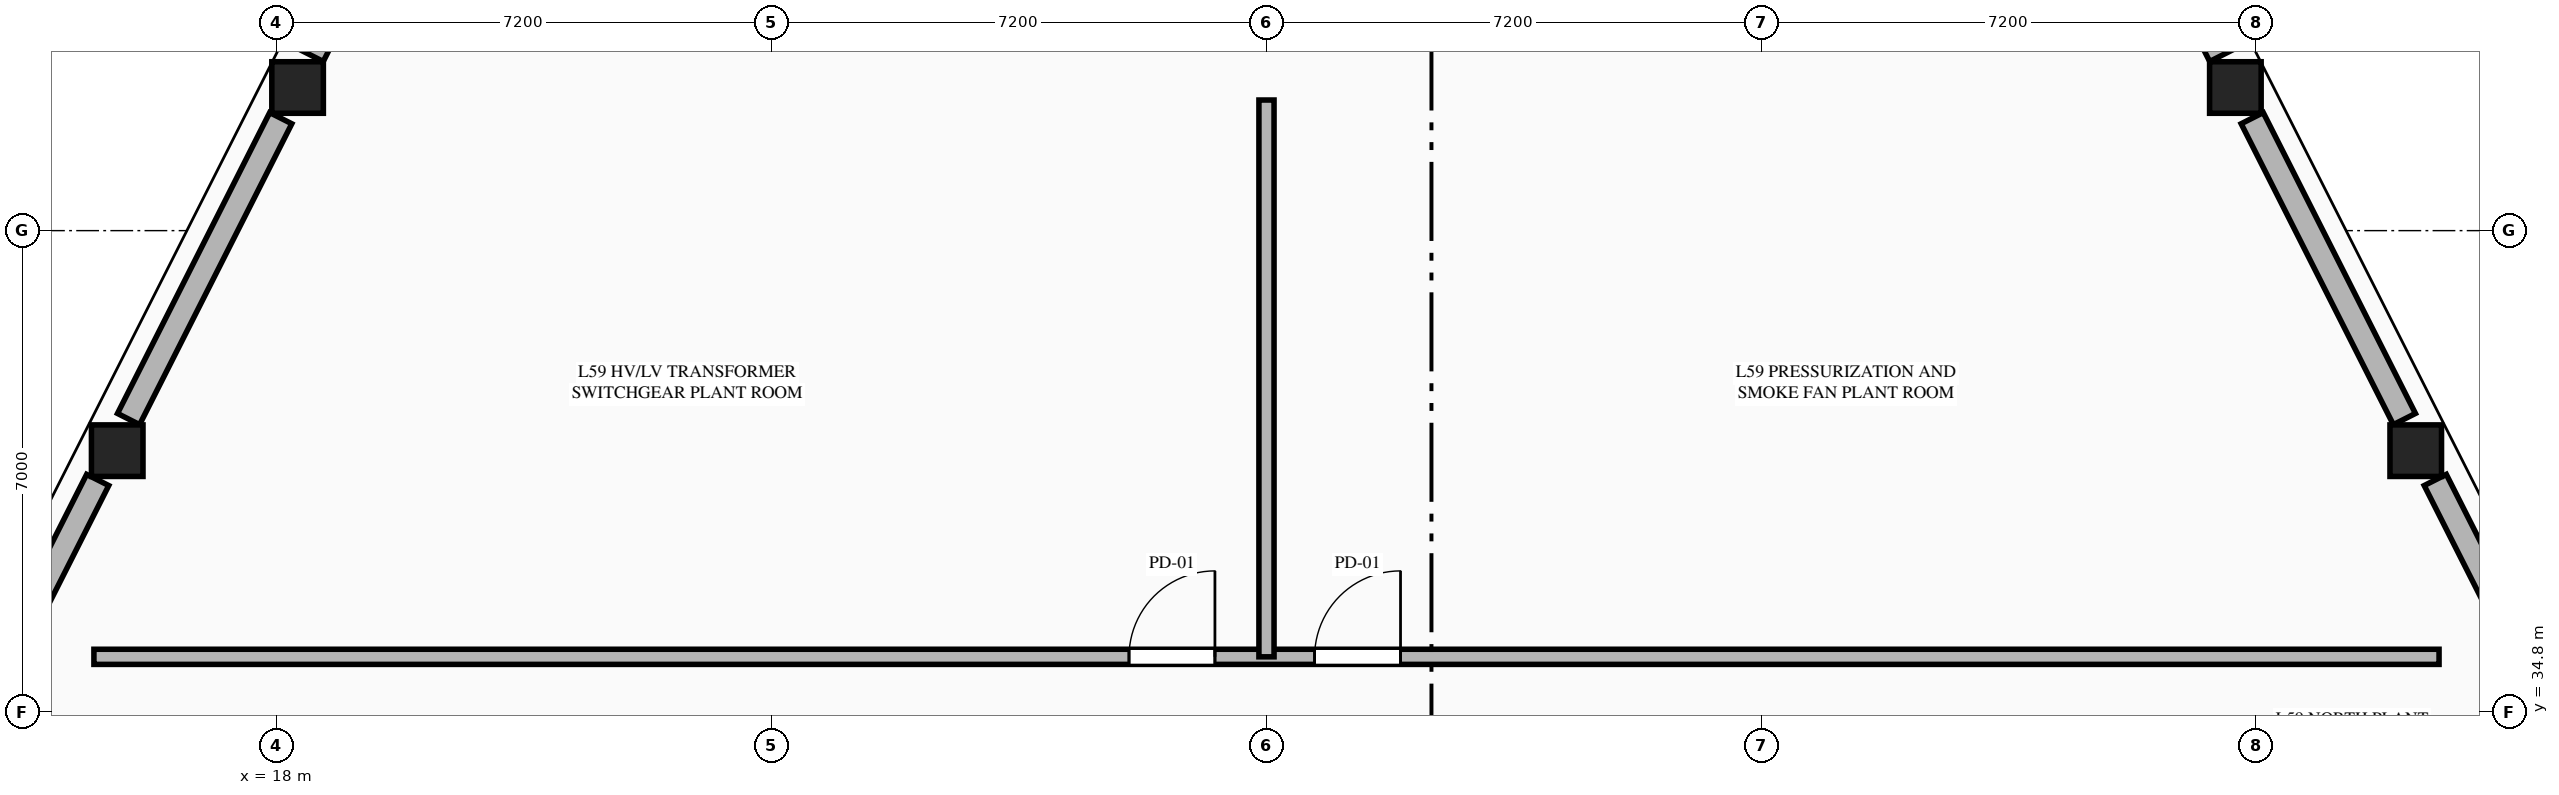
"""IFC4 building model, lengths in metres.
Left out: names, types, materials, properties, quantities, classifications, styles, units other than length and angle.
Written with IfcOpenShell. Run it as: python <this file> out.ifc"""

import sys

from ifc_helpers import new_model, si_unit, direction, frame, frame_2d, origin, origin_2d, place, context, subcontext, project, spatial, rectangle, extrude, element, fill, save


model = new_model("IFC4")
c1 = context("Model", 3, precision=1e-05, world=origin(), true_north=direction((0.0, 1.0)))
c2 = subcontext(c1, "Body", "Model", "MODEL_VIEW")
j1 = project(units=[si_unit("LENGTHUNIT", "METRE"), si_unit("PLANEANGLEUNIT", "RADIAN")], contexts=[c1])
p1 = place(None, origin())
s1 = spatial("IfcSite", under=j1, at=p1, CompositionType="ELEMENT")
p2 = place(p1, origin())
s2 = spatial("IfcBuilding", under=s1, at=p2, CompositionType="ELEMENT")
p3 = place(p2, frame((0.0, 0.0, 221.6)))
s3 = spatial("IfcBuildingStorey", under=s2, at=p3, CompositionType="ELEMENT", Elevation=221.6)
for number, where, z_axis, x_axis in (
    (1, (49.119, 38.599, 0.0), (0.0, 0.0, 1.0), (1.0, 0.0, 0.0)),
    (2, (46.495, 43.882, 0.0), (0.0, 0.0, 1.0), (1.0, 0.0, 0.0)),
    (3, (18.305, 43.882, 0.0), (0.0, 0.0, 1.0), (1.0, 0.0, 0.0)),
    (4, (15.681, 38.599, 0.0), (0.0, 0.0, 1.0), (1.0, 0.0, 0.0)),
):
    element("IfcColumn", number, at=place(p3, frame(where, z_axis=z_axis, x_axis=x_axis)), inside=s3, PredefinedType="COLUMN", context=c2, shape_type="SweptSolid", body=[
        extrude(rectangle(XDim=0.75, YDim=0.75, at=origin_2d()), origin(), (0.0, 0.0, 1.0), 5.4),
    ])
p4 = place(p3, frame((15.342, 35.6, 0.0), z_axis=(0.0, 0.0, 1.0), x_axis=(1.0, 0.0, 0.0)))
e5 = element("IfcWall", 5, at=p4, inside=s3, PredefinedType="PARTITIONING", context=c2, shape_type="SweptSolid", body=[
    extrude(rectangle(XDim=34.116, YDim=0.22, at=frame_2d((17.058, 0.0))), origin(), (0.0, 0.0, 1.0), 5.2),
])
p5 = place(p4, frame((15.058, 0.0, 0.0)))
e6 = element("IfcOpeningElement", 6, at=p5, cuts=e5, PredefinedType="OPENING", context=c2, shape_type="SweptSolid", body=[
    extrude(rectangle(XDim=1.25, YDim=2.25, at=frame_2d((0.625, 1.125))), frame((0.0, 0.12, 0.0), z_axis=(0.0, -1.0, 0.0), x_axis=(1.0, 0.0, 0.0)), (0.0, 0.0, 1.0), 0.24),
])
p6 = place(p4, frame((17.758, 0.0, 0.0)))
e7 = element("IfcOpeningElement", 7, at=p6, cuts=e5, PredefinedType="OPENING", context=c2, shape_type="SweptSolid", body=[
    extrude(rectangle(XDim=1.25, YDim=2.25, at=frame_2d((0.625, 1.125))), frame((0.0, 0.12, 0.0), z_axis=(0.0, -1.0, 0.0), x_axis=(1.0, 0.0, 0.0)), (0.0, 0.0, 1.0), 0.24),
])
p7 = place(p3, frame((32.4, 35.6, 0.0), z_axis=(0.0, 0.0, 1.0), x_axis=(0.0, 1.0, 0.0)))
e8 = element("IfcWall", 8, at=p7, inside=s3, PredefinedType="PARTITIONING", context=c2, shape_type="SweptSolid", body=[
    extrude(rectangle(XDim=8.1, YDim=0.22, at=frame_2d((4.05, 0.0))), origin(), (0.0, 0.0, 1.0), 5.2),
])
p8 = place(p3, frame((51.7, 33.631, 0.0), z_axis=(0.0, 0.0, 1.0), x_axis=(-0.451276600056, 0.892384127067, 0.0)))
e9 = element("IfcWall", 9, at=p8, inside=s3, PredefinedType="STANDARD", context=c2, shape_type="SweptSolid", body=[
    extrude(rectangle(XDim=5.09, YDim=0.36, at=frame_2d((2.545, 0.0))), origin(), (0.0, 0.0, 1.0), 3.79),
])
p9 = place(p3, frame((48.954, 39.059, 0.0), z_axis=(0.0, 0.0, 1.0), x_axis=(-0.451389625798, 0.892326961221, 0.0)))
e10 = element("IfcWall", 10, at=p9, inside=s3, PredefinedType="STANDARD", context=c2, shape_type="SweptSolid", body=[
    extrude(rectangle(XDim=4.905, YDim=0.36, at=frame_2d((2.453, 0.0))), origin(), (0.0, 0.0, 1.0), 3.79),
])
for number, where, z_axis, x_axis in (
    (11, (46.282, 44.342, 0.0), (0.0, 0.0, 1.0), (-0.451, 0.892, 0.0)),
    (12, (18.919, 45.135, 0.0), (0.0, 0.0, 1.0), (-0.451, -0.892, 0.0)),
):
    element("IfcWall", number, at=place(p3, frame(where, z_axis=z_axis, x_axis=x_axis)), inside=s3, PredefinedType="STANDARD", context=c2, shape_type="SweptSolid", body=[
        extrude(rectangle(XDim=0.888, YDim=0.36, at=frame_2d((0.444, 0.0))), origin(), (0.0, 0.0, 1.0), 5.2),
    ])
p10 = place(p3, frame((18.06, 43.436, 0.0), z_axis=(0.0, 0.0, 1.0), x_axis=(-0.451389625798, -0.892326961221, 0.0)))
e13 = element("IfcWall", 13, at=p10, inside=s3, PredefinedType="STANDARD", context=c2, shape_type="SweptSolid", body=[
    extrude(rectangle(XDim=4.905, YDim=0.36, at=frame_2d((2.453, 0.0))), origin(), (0.0, 0.0, 1.0), 3.79),
])
p11 = place(p3, frame((15.397, 38.173, 0.0), z_axis=(0.0, 0.0, 1.0), x_axis=(-0.451276600056, -0.892384127067, 0.0)))
e14 = element("IfcWall", 14, at=p11, inside=s3, PredefinedType="STANDARD", context=c2, shape_type="SweptSolid", body=[
    extrude(rectangle(XDim=5.09, YDim=0.36, at=frame_2d((2.545, 0.0))), origin(), (0.0, 0.0, 1.0), 3.79),
])
p12 = place(p5, origin())
e15 = element("IfcDoor", 15, at=p12, inside=s3, OperationType="SINGLE_SWING_RIGHT", PredefinedType="DOOR", context=c2, shape_type="SweptSolid", body=[
    extrude(rectangle(XDim=1.25, YDim=2.25, at=frame_2d((0.625, 1.125))), frame((0.0, 0.025, 0.0), z_axis=(0.0, -1.0, 0.0), x_axis=(1.0, 0.0, 0.0)), (0.0, 0.0, 1.0), 0.05),
])
fill(e6, e15)
p13 = place(p6, origin())
e16 = element("IfcDoor", 16, at=p13, inside=s3, OperationType="SINGLE_SWING_RIGHT", PredefinedType="DOOR", context=c2, shape_type="SweptSolid", body=[
    extrude(rectangle(XDim=1.25, YDim=2.25, at=frame_2d((0.625, 1.125))), frame((0.0, 0.025, 0.0), z_axis=(0.0, -1.0, 0.0), x_axis=(1.0, 0.0, 0.0)), (0.0, 0.0, 1.0), 0.05),
])
fill(e7, e16)
save(model, sys.argv[1])
